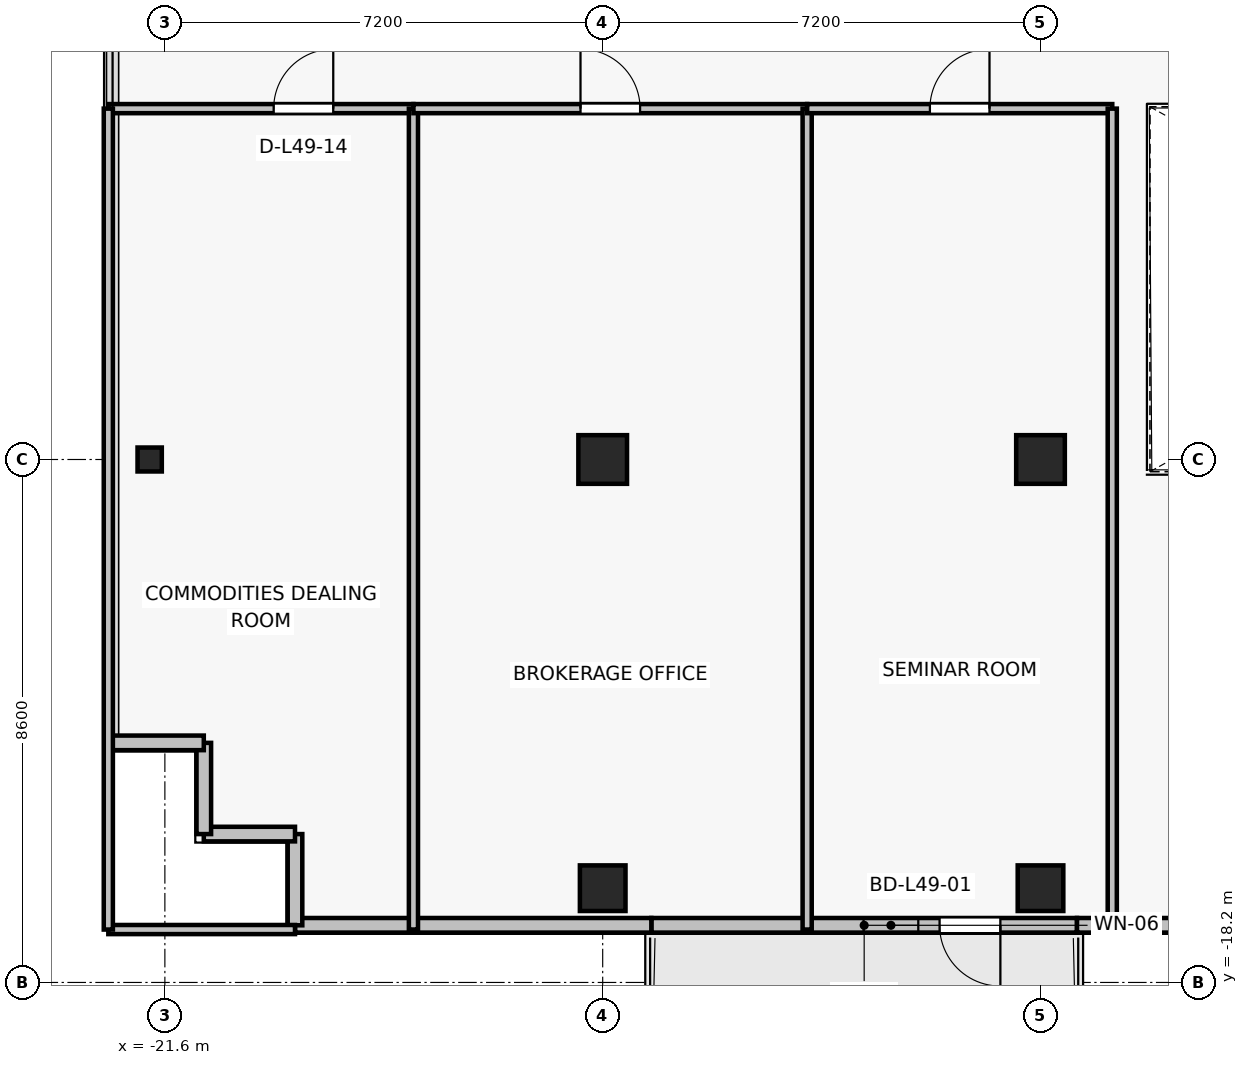
"""IFC4 building model, lengths in metres.
Left out: names, types, materials, properties, quantities, classifications, styles, units other than length and angle.
Written with IfcOpenShell. Run it as: python <this file> out.ifc"""

import sys

from ifc_helpers import new_model, si_unit, direction, frame, frame_2d, origin, origin_2d, place, context, subcontext, project, spatial, rectangle, i_section, extrude, source, transform, mapped, element, fill, save


model = new_model("IFC4")
c1 = context("Model", 3, precision=1e-05, world=origin(), true_north=direction((0.0, 1.0)))
c2 = subcontext(c1, "Body", "Model", "MODEL_VIEW")
j1 = project(units=[si_unit("LENGTHUNIT", "METRE"), si_unit("PLANEANGLEUNIT", "RADIAN")], contexts=[c1])
p1 = place(None, origin())
s1 = spatial("IfcSite", under=j1, at=p1, CompositionType="ELEMENT")
p2 = place(p1, origin())
s2 = spatial("IfcBuilding", under=s1, at=p2, CompositionType="ELEMENT")
p3 = place(p2, frame((0.0, 0.0, 175.9)))
s3 = spatial("IfcBuildingStorey", under=s2, at=p3, CompositionType="ELEMENT", Elevation=175.9)
for number, where, z_axis, x_axis in (
    (1, (-14.4, -9.6, 0.0), (0.0, 0.0, 1.0), (1.0, 0.0, 0.0)),
    (2, (-7.2, -9.6, 0.0), (0.0, 0.0, 1.0), (1.0, 0.0, 0.0)),
):
    element("IfcColumn", number, at=place(p3, frame(where, z_axis=z_axis, x_axis=x_axis)), inside=s3, PredefinedType="COLUMN", context=c2, shape_type="SweptSolid", body=[
        extrude(rectangle(XDim=0.8, YDim=0.8, at=origin_2d()), origin(), (0.0, 0.0, 1.0), 3.3),
    ])
for number, where, z_axis, x_axis in (
    (3, (-14.4, -16.65, 0.0), (0.0, 0.0, 1.0), (1.0, 0.0, 0.0)),
    (4, (-7.2, -16.65, 0.0), (0.0, 0.0, 1.0), (1.0, 0.0, 0.0)),
):
    element("IfcColumn", number, at=place(p3, frame(where, z_axis=z_axis, x_axis=x_axis)), inside=s3, PredefinedType="COLUMN", context=c2, shape_type="SweptSolid", body=[
        extrude(rectangle(XDim=0.75, YDim=0.75, at=origin_2d()), origin(), (0.0, 0.0, 1.0), 3.3),
    ])
p4 = place(p3, frame((-21.85, -9.6, 0.0), z_axis=(0.0, 0.0, 1.0), x_axis=(1.0, 0.0, 0.0)))
e5 = element("IfcColumn", 5, at=p4, inside=s3, PredefinedType="COLUMN", context=c2, shape_type="SweptSolid", body=[
    extrude(i_section(OverallWidth=0.399, OverallDepth=0.394, WebThickness=0.023, FlangeThickness=0.037, FilletRadius=0.015, at=origin_2d()), origin(), (0.0, 0.0, 1.0), 3.3),
])
p5 = place(p3, frame((-6.6, -17.26, 0.0), z_axis=(0.0, 0.0, 1.0), x_axis=(-1.0, 0.0, 0.0)))
e6 = element("IfcWall", 6, at=p5, inside=s3, PredefinedType="SOLIDWALL", context=c2, shape_type="SweptSolid", body=[
    extrude(rectangle(XDim=7.0, YDim=0.24, at=frame_2d((3.5, 0.0))), origin(), (0.0, 0.0, 1.0), 2.665),
])
p6 = place(p5, frame((1.26, 0.0, 0.0)))
e7 = element("IfcOpeningElement", 7, at=p6, cuts=e6, PredefinedType="OPENING", context=c2, shape_type="SweptSolid", body=[
    extrude(rectangle(XDim=1.0, YDim=2.2, at=frame_2d((0.5, 1.1))), frame((0.0, 0.13, 0.0), z_axis=(0.0, -1.0, 0.0), x_axis=(1.0, 0.0, 0.0)), (0.0, 0.0, 1.0), 0.26),
])
p7 = place(p5, frame((2.61, 0.0, 0.85)))
e8 = element("IfcOpeningElement", 8, at=p7, cuts=e6, PredefinedType="OPENING", context=c2, shape_type="SweptSolid", body=[
    extrude(rectangle(XDim=0.9, YDim=1.35, at=frame_2d((0.45, 0.675))), frame((0.0, 0.13, 0.0), z_axis=(0.0, -1.0, 0.0), x_axis=(1.0, 0.0, 0.0)), (0.0, 0.0, 1.0), 0.26),
])
p8 = place(p3, frame((-6.6, -17.26, 0.0), z_axis=(0.0, 0.0, 1.0), x_axis=(1.0, 0.0, 0.0)))
e9 = element("IfcWall", 9, at=p8, inside=s3, PredefinedType="SOLIDWALL", context=c2, shape_type="SweptSolid", body=[
    extrude(rectangle(XDim=3.4, YDim=0.24, at=frame_2d((1.7, 0.0))), origin(), (0.0, 0.0, 1.0), 3.075),
])
p9 = place(p3, frame((-19.46, -17.26, 0.0), z_axis=(0.0, 0.0, 1.0), x_axis=(1.0, 0.0, 0.0)))
e10 = element("IfcWall", 10, at=p9, inside=s3, PredefinedType="SOLIDWALL", context=c2, shape_type="SweptSolid", body=[
    extrude(rectangle(XDim=5.86, YDim=0.24, at=frame_2d((2.93, 0.0))), origin(), (0.0, 0.0, 1.0), 2.665),
])
for number, where, z_axis, x_axis in (
    (11, (-19.46, -15.76, 0.0), (0.0, 0.0, 1.0), (0.0, -1.0, 0.0)),
    (12, (-20.96, -15.76, 0.0), (0.0, 0.0, 1.0), (1.0, 0.0, 0.0)),
    (13, (-20.96, -14.26, 0.0), (0.0, 0.0, 1.0), (0.0, -1.0, 0.0)),
    (14, (-22.46, -14.26, 0.0), (0.0, 0.0, 1.0), (1.0, 0.0, 0.0)),
):
    element("IfcWall", number, at=place(p3, frame(where, z_axis=z_axis, x_axis=x_axis)), inside=s3, PredefinedType="SOLIDWALL", context=c2, shape_type="SweptSolid", body=[
        extrude(rectangle(XDim=1.5, YDim=0.24, at=frame_2d((0.75, 0.0))), origin(), (0.0, 0.0, 1.0), 3.075),
    ])
p10 = place(p3, frame((-19.46, -17.33, 0.0), z_axis=(0.0, 0.0, 1.0), x_axis=(-1.0, 0.0, 0.0)))
e15 = element("IfcWall", 15, at=p10, inside=s3, PredefinedType="PARTITIONING", context=c2, shape_type="SweptSolid", body=[
    extrude(rectangle(XDim=3.07, YDim=0.15, at=frame_2d((1.535, 0.0))), origin(), (0.0, 0.0, 1.0), 3.075),
])
p11 = place(p3, frame((-22.53, -3.83, 0.0), z_axis=(0.0, 0.0, 1.0), x_axis=(1.0, 0.0, 0.0)))
e16 = element("IfcWall", 16, at=p11, inside=s3, PredefinedType="PARTITIONING", context=c2, shape_type="SweptSolid", body=[
    extrude(rectangle(XDim=5.018, YDim=0.15, at=frame_2d((2.509, 0.0))), origin(), (0.0, 0.0, 1.0), 2.565),
])
p12 = place(p11, frame((2.719, 0.0, 0.0)))
e17 = element("IfcOpeningElement", 17, at=p12, cuts=e16, PredefinedType="OPENING", context=c2, shape_type="SweptSolid", body=[
    extrude(rectangle(XDim=0.98, YDim=2.15, at=frame_2d((0.49, 1.075))), frame((0.0, 0.085, 0.0), z_axis=(0.0, -1.0, 0.0), x_axis=(1.0, 0.0, 0.0)), (0.0, 0.0, 1.0), 0.17),
])
p13 = place(p3, frame((-22.53, -17.33, 0.0), z_axis=(0.0, 0.0, 1.0), x_axis=(0.0, 1.0, 0.0)))
e18 = element("IfcWall", 18, at=p13, inside=s3, PredefinedType="PARTITIONING", context=c2, shape_type="SweptSolid", body=[
    extrude(rectangle(XDim=13.5, YDim=0.15, at=frame_2d((6.75, 0.0))), origin(), (0.0, 0.0, 1.0), 2.665),
])
p14 = place(p3, frame((-17.512, -3.83, 0.0), z_axis=(0.0, 0.0, 1.0), x_axis=(0.0, -1.0, 0.0)))
e19 = element("IfcWall", 19, at=p14, inside=s3, PredefinedType="PARTITIONING", context=c2, shape_type="SweptSolid", body=[
    extrude(rectangle(XDim=13.5, YDim=0.15, at=frame_2d((6.75, 0.0))), origin(), (0.0, 0.0, 1.0), 2.565),
])
p15 = place(p3, frame((-17.512, -3.83, 0.0), z_axis=(0.0, 0.0, 1.0), x_axis=(1.0, 0.0, 0.0)))
e20 = element("IfcWall", 20, at=p15, inside=s3, PredefinedType="PARTITIONING", context=c2, shape_type="SweptSolid", body=[
    extrude(rectangle(XDim=6.475, YDim=0.15, at=frame_2d((3.237, 0.0))), origin(), (0.0, 0.0, 1.0), 2.565),
])
p16 = place(p15, frame((2.747, 0.0, 0.0)))
e21 = element("IfcOpeningElement", 21, at=p16, cuts=e20, PredefinedType="OPENING", context=c2, shape_type="SweptSolid", body=[
    extrude(rectangle(XDim=0.98, YDim=2.15, at=frame_2d((0.49, 1.075))), frame((0.0, 0.085, 0.0), z_axis=(0.0, -1.0, 0.0), x_axis=(1.0, 0.0, 0.0)), (0.0, 0.0, 1.0), 0.17),
])
p17 = place(p3, frame((-11.038, -3.83, 0.0), z_axis=(0.0, 0.0, 1.0), x_axis=(0.0, -1.0, 0.0)))
e22 = element("IfcWall", 22, at=p17, inside=s3, PredefinedType="PARTITIONING", context=c2, shape_type="SweptSolid", body=[
    extrude(rectangle(XDim=13.5, YDim=0.15, at=frame_2d((6.75, 0.0))), origin(), (0.0, 0.0, 1.0), 2.565),
])
p18 = place(p3, frame((-11.038, -3.83, 0.0), z_axis=(0.0, 0.0, 1.0), x_axis=(1.0, 0.0, 0.0)))
e23 = element("IfcWall", 23, at=p18, inside=s3, PredefinedType="PARTITIONING", context=c2, shape_type="SweptSolid", body=[
    extrude(rectangle(XDim=5.018, YDim=0.15, at=frame_2d((2.509, 0.0))), origin(), (0.0, 0.0, 1.0), 2.565),
])
p19 = place(p18, frame((2.019, 0.0, 0.0)))
e24 = element("IfcOpeningElement", 24, at=p19, cuts=e23, PredefinedType="OPENING", context=c2, shape_type="SweptSolid", body=[
    extrude(rectangle(XDim=0.98, YDim=2.15, at=frame_2d((0.49, 1.075))), frame((0.0, 0.085, 0.0), z_axis=(0.0, -1.0, 0.0), x_axis=(1.0, 0.0, 0.0)), (0.0, 0.0, 1.0), 0.17),
])
p20 = place(p3, frame((-6.02, -3.83, 0.0), z_axis=(0.0, 0.0, 1.0), x_axis=(0.0, -1.0, 0.0)))
e25 = element("IfcWall", 25, at=p20, inside=s3, PredefinedType="PARTITIONING", context=c2, shape_type="SweptSolid", body=[
    extrude(rectangle(XDim=13.5, YDim=0.15, at=frame_2d((6.75, 0.0))), origin(), (0.0, 0.0, 1.0), 2.565),
])
m1 = source(origin(), c2, "Body", "SweptSolid", [
    extrude(rectangle(XDim=1.0, YDim=2.2, at=frame_2d((0.5, 1.1))), frame((0.0, 0.025, 0.0), z_axis=(0.0, -1.0, 0.0), x_axis=(1.0, 0.0, 0.0)), (0.0, 0.0, 1.0), 0.05),
])
p21 = place(p6, origin())
e26 = element("IfcDoor", 26, at=p21, inside=s3, OperationType="SINGLE_SWING_LEFT", PredefinedType="DOOR", context=c2, shape_type="MappedRepresentation", body=[
    mapped(m1, transform((0.0, 0.0, 0.0), x_axis=(1.0, 0.0, 0.0), y_axis=(0.0, 1.0, 0.0), z_axis=(0.0, 0.0, 1.0), scale=1.0)),
])
fill(e7, e26)
m2 = source(origin(), c2, "Body", "SweptSolid", [
    extrude(rectangle(XDim=0.9, YDim=1.35, at=frame_2d((0.45, 0.675))), frame((0.0, 0.03, 0.0), z_axis=(0.0, -1.0, 0.0), x_axis=(1.0, 0.0, 0.0)), (0.0, 0.0, 1.0), 0.06),
])
p22 = place(p7, origin())
e27 = element("IfcWindow", 27, at=p22, inside=s3, PartitioningType="SINGLE_PANEL", PredefinedType="WINDOW", context=c2, shape_type="MappedRepresentation", body=[
    mapped(m2, transform((0.0, 0.0, 0.0), x_axis=(1.0, 0.0, 0.0), y_axis=(0.0, 1.0, 0.0), z_axis=(0.0, 0.0, 1.0), scale=1.0)),
])
fill(e8, e27)
m3 = source(origin(), c2, "Body", "SweptSolid", [
    extrude(rectangle(XDim=0.98, YDim=2.15, at=frame_2d((0.49, 1.075))), frame((0.0, 0.025, 0.0), z_axis=(0.0, -1.0, 0.0), x_axis=(1.0, 0.0, 0.0)), (0.0, 0.0, 1.0), 0.05),
])
p23 = place(p12, origin())
e28 = element("IfcDoor", 28, at=p23, inside=s3, OperationType="SINGLE_SWING_RIGHT", PredefinedType="DOOR", context=c2, shape_type="MappedRepresentation", body=[
    mapped(m3, transform((0.0, 0.0, 0.0), x_axis=(1.0, 0.0, 0.0), y_axis=(0.0, 1.0, 0.0), z_axis=(0.0, 0.0, 1.0), scale=1.0)),
])
fill(e17, e28)
p24 = place(p16, origin())
e29 = element("IfcDoor", 29, at=p24, inside=s3, OperationType="SINGLE_SWING_LEFT", PredefinedType="DOOR", context=c2, shape_type="MappedRepresentation", body=[
    mapped(m3, transform((0.0, 0.0, 0.0), x_axis=(1.0, 0.0, 0.0), y_axis=(0.0, 1.0, 0.0), z_axis=(0.0, 0.0, 1.0), scale=1.0)),
])
fill(e21, e29)
p25 = place(p19, origin())
e30 = element("IfcDoor", 30, at=p25, inside=s3, OperationType="SINGLE_SWING_RIGHT", PredefinedType="DOOR", context=c2, shape_type="MappedRepresentation", body=[
    mapped(m3, transform((0.0, 0.0, 0.0), x_axis=(1.0, 0.0, 0.0), y_axis=(0.0, 1.0, 0.0), z_axis=(0.0, 0.0, 1.0), scale=1.0)),
])
fill(e24, e30)
save(model, sys.argv[1])
